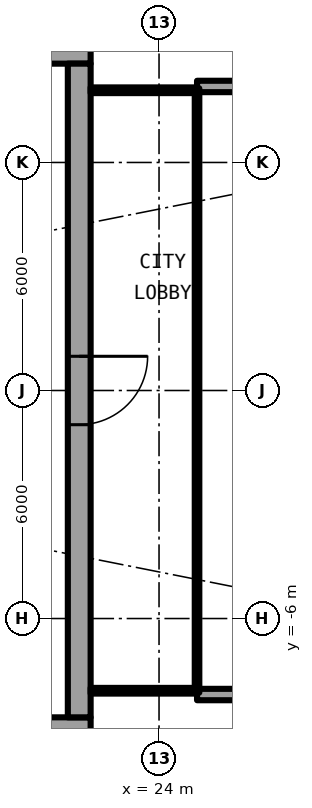
"""IFC4 building model, lengths in metres.
Left out: names, types, materials, properties, quantities, classifications, styles, units other than length and angle.
Written with IfcOpenShell. Run it as: python <this file> out.ifc"""

import sys

from ifc_helpers import new_model, si_unit, direction, frame, frame_2d, origin, place, context, subcontext, project, spatial, rectangle, extrude, element, fill, save


model = new_model("IFC4")
c1 = context("Model", 3, precision=1e-05, world=origin(), true_north=direction((0.0, 1.0)))
c2 = subcontext(c1, "Body", "Model", "MODEL_VIEW")
j1 = project(units=[si_unit("LENGTHUNIT", "METRE"), si_unit("PLANEANGLEUNIT", "RADIAN")], contexts=[c1])
p1 = place(None, origin())
s1 = spatial("IfcSite", under=j1, at=p1, CompositionType="ELEMENT")
p2 = place(p1, origin())
s2 = spatial("IfcBuilding", under=s1, at=p2, CompositionType="ELEMENT")
p3 = place(p2, frame((0.0, 0.0, 111.65)))
s3 = spatial("IfcBuildingStorey", under=s2, at=p3, CompositionType="ELEMENT", Elevation=111.65)
for number, where, z_axis, x_axis in (
    (1, (25.0, 8.0, 0.0), (0.0, 0.0, 1.0), (1.0, 0.0, 0.0)),
    (2, (25.0, -8.0, 0.0), (0.0, 0.0, 1.0), (1.0, 0.0, 0.0)),
):
    element("IfcWall", number, at=place(p3, frame(where, z_axis=z_axis, x_axis=x_axis)), inside=s3, PredefinedType="SOLIDWALL", context=c2, shape_type="SweptSolid", body=[
        extrude(rectangle(XDim=2.667, YDim=0.3, at=frame_2d((1.333, 0.0))), origin(), (0.0, 0.0, 1.0), 2.7),
    ])
p4 = place(p3, frame((22.2, 8.9, 0.0), z_axis=(0.0, 0.0, 1.0), x_axis=(-1.0, 0.0, 0.0)))
e3 = element("IfcWall", 3, at=p4, inside=s3, PredefinedType="SHEAR", context=c2, shape_type="SweptSolid", body=[
    extrude(rectangle(XDim=13.8, YDim=0.6, at=frame_2d((6.9, 0.0))), origin(), (0.0, 0.0, 1.0), 3.05),
])
p5 = place(p4, frame((1.125, 0.0, 0.0)))
e4 = element("IfcOpeningElement", 4, at=p5, cuts=e3, PredefinedType="OPENING", context=c2, shape_type="SweptSolid", body=[
    extrude(rectangle(XDim=1.2, YDim=2.3, at=frame_2d((0.6, 1.15))), frame((0.0, 0.31, 0.0), z_axis=(0.0, -1.0, 0.0), x_axis=(1.0, 0.0, 0.0)), (0.0, 0.0, 1.0), 0.62),
])
p6 = place(p3, frame((8.4, -8.9, 0.0), z_axis=(0.0, 0.0, 1.0), x_axis=(1.0, 0.0, 0.0)))
e5 = element("IfcWall", 5, at=p6, inside=s3, PredefinedType="SHEAR", context=c2, shape_type="SweptSolid", body=[
    extrude(rectangle(XDim=13.8, YDim=0.6, at=frame_2d((6.9, 0.0))), origin(), (0.0, 0.0, 1.0), 3.05),
])
p7 = place(p6, frame((11.475, 0.0, 0.0)))
e6 = element("IfcOpeningElement", 6, at=p7, cuts=e5, PredefinedType="OPENING", context=c2, shape_type="SweptSolid", body=[
    extrude(rectangle(XDim=1.2, YDim=2.3, at=frame_2d((0.6, 1.15))), frame((0.0, 0.31, 0.0), z_axis=(0.0, -1.0, 0.0), x_axis=(1.0, 0.0, 0.0)), (0.0, 0.0, 1.0), 0.62),
])
p8 = place(p3, frame((21.9, 8.6, 0.0), z_axis=(0.0, 0.0, 1.0), x_axis=(0.0, -1.0, 0.0)))
e7 = element("IfcWall", 7, at=p8, inside=s3, PredefinedType="SHEAR", context=c2, shape_type="SweptSolid", body=[
    extrude(rectangle(XDim=17.2, YDim=0.6, at=frame_2d((8.6, 0.0))), origin(), (0.0, 0.0, 1.0), 3.05),
])
p9 = place(p8, frame((7.7, 0.0, 0.0)))
e8 = element("IfcOpeningElement", 8, at=p9, cuts=e7, PredefinedType="OPENING", context=c2, shape_type="SweptSolid", body=[
    extrude(rectangle(XDim=1.8, YDim=2.3, at=frame_2d((0.9, 1.15))), frame((0.0, 0.31, 0.0), z_axis=(0.0, -1.0, 0.0), x_axis=(1.0, 0.0, 0.0)), (0.0, 0.0, 1.0), 0.62),
])
for number, where, z_axis, x_axis in (
    (9, (22.2, -7.9, 0.0), (0.0, 0.0, 1.0), (1.0, 0.0, 0.0)),
    (10, (22.2, 7.9, 0.0), (0.0, 0.0, 1.0), (1.0, 0.0, 0.0)),
):
    element("IfcWall", number, at=place(p3, frame(where, z_axis=z_axis, x_axis=x_axis)), inside=s3, PredefinedType="PARTITIONING", context=c2, shape_type="SweptSolid", body=[
        extrude(rectangle(XDim=2.74, YDim=0.15, at=frame_2d((1.37, 0.0))), origin(), (0.0, 0.0, 1.0), 2.7),
    ])
p10 = place(p3, frame((25.0, -7.95, 0.0), z_axis=(0.0, 0.0, 1.0), x_axis=(0.0, 1.0, 0.0)))
e11 = element("IfcWall", 11, at=p10, inside=s3, PredefinedType="PARTITIONING", context=c2, shape_type="SweptSolid", body=[
    extrude(rectangle(XDim=15.9, YDim=0.12, at=frame_2d((7.95, 0.0))), origin(), (0.0, 0.0, 1.0), 2.7),
])
p11 = place(p10, frame((0.95, 0.0, 0.1)))
e12 = element("IfcOpeningElement", 12, at=p11, cuts=e11, PredefinedType="OPENING", context=c2, shape_type="SweptSolid", body=[
    extrude(rectangle(XDim=14.0, YDim=2.35, at=frame_2d((7.0, 1.175))), frame((0.0, 0.07, 0.0), z_axis=(0.0, -1.0, 0.0), x_axis=(1.0, 0.0, 0.0)), (0.0, 0.0, 1.0), 0.14),
])
p12 = place(p9, origin())
e13 = element("IfcDoor", 13, at=p12, inside=s3, OperationType="SINGLE_SWING_LEFT", PredefinedType="DOOR", context=c2, shape_type="SweptSolid", body=[
    extrude(rectangle(XDim=1.8, YDim=2.3, at=frame_2d((0.9, 1.15))), frame((0.0, 0.025, 0.0), z_axis=(0.0, -1.0, 0.0), x_axis=(1.0, 0.0, 0.0)), (0.0, 0.0, 1.0), 0.05),
])
fill(e8, e13)
p13 = place(p11, origin())
e14 = element("IfcWindow", 14, at=p13, inside=s3, PartitioningType="SINGLE_PANEL", PredefinedType="WINDOW", context=c2, shape_type="SweptSolid", body=[
    extrude(rectangle(XDim=14.0, YDim=2.35, at=frame_2d((7.0, 1.175))), frame((0.0, 0.03, 0.0), z_axis=(0.0, -1.0, 0.0), x_axis=(1.0, 0.0, 0.0)), (0.0, 0.0, 1.0), 0.06),
])
fill(e12, e14)
save(model, sys.argv[1])
